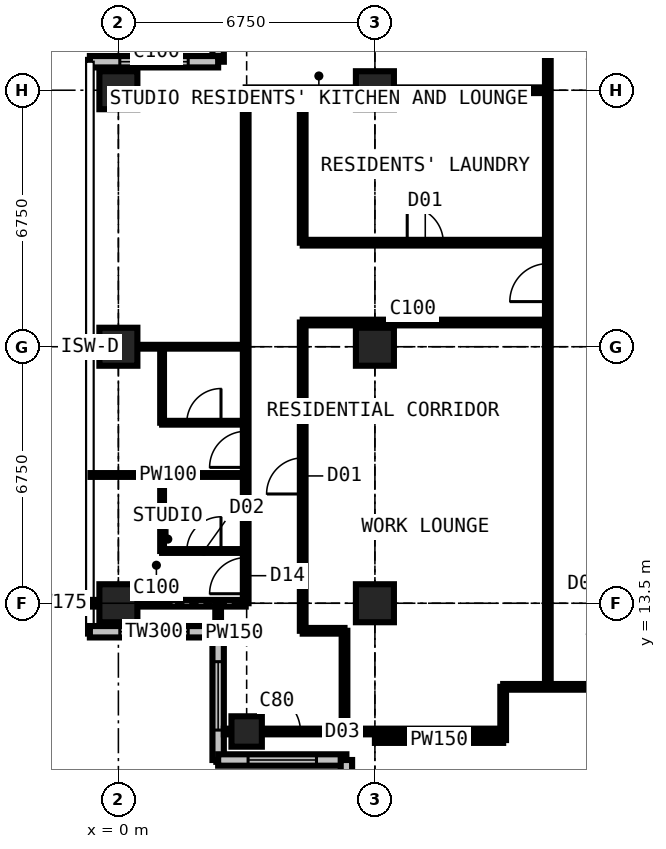
"""IFC4 building model, lengths in metres.
Left out: names, types, materials, properties, quantities, classifications, styles, units other than length and angle.
Written with IfcOpenShell. Run it as: python <this file> out.ifc"""

import sys

from ifc_helpers import new_model, si_unit, direction, frame, frame_2d, origin, origin_2d, place, context, subcontext, project, spatial, rectangle, extrude, element, fill, save


model = new_model("IFC4")
c1 = context("Model", 3, precision=1e-05, world=origin(), true_north=direction((0.0, 1.0)))
c2 = subcontext(c1, "Body", "Model", "MODEL_VIEW")
j1 = project(units=[si_unit("LENGTHUNIT", "METRE"), si_unit("PLANEANGLEUNIT", "RADIAN")], contexts=[c1])
p1 = place(None, origin())
s1 = spatial("IfcSite", under=j1, at=p1, CompositionType="ELEMENT")
p2 = place(p1, origin())
s2 = spatial("IfcBuilding", under=s1, at=p2, CompositionType="ELEMENT")
p3 = place(p2, frame((0.0, 0.0, 247.5)))
s3 = spatial("IfcBuildingStorey", under=s2, at=p3, CompositionType="ELEMENT", Elevation=247.5)
for number, where, z_axis, x_axis in (
    (1, (0.0, 13.5, 0.0), (0.0, 0.0, 1.0), (1.0, 0.0, 0.0)),
    (2, (0.0, 20.25, 0.0), (0.0, 0.0, 1.0), (1.0, 0.0, 0.0)),
    (3, (0.0, 27.0, 0.0), (0.0, 0.0, 1.0), (1.0, 0.0, 0.0)),
):
    element("IfcColumn", number, at=place(p3, frame(where, z_axis=z_axis, x_axis=x_axis)), inside=s3, PredefinedType="COLUMN", context=c2, shape_type="SweptSolid", body=[
        extrude(rectangle(XDim=1.0, YDim=1.0, at=origin_2d()), origin(), (0.0, 0.0, 1.0), 3.6),
    ])
p4 = place(p3, frame((3.375, 10.125, 0.0), z_axis=(0.0, 0.0, 1.0), x_axis=(1.0, 0.0, 0.0)))
e4 = element("IfcColumn", 4, at=p4, inside=s3, PredefinedType="COLUMN", context=c2, shape_type="SweptSolid", body=[
    extrude(rectangle(XDim=0.8, YDim=0.8, at=origin_2d()), origin(), (0.0, 0.0, 1.0), 3.6),
])
for number, where, z_axis, x_axis in (
    (5, (6.75, 13.5, 0.0), (0.0, 0.0, 1.0), (1.0, 0.0, 0.0)),
    (6, (6.75, 20.25, 0.0), (0.0, 0.0, 1.0), (1.0, 0.0, 0.0)),
    (7, (6.75, 27.0, 0.0), (0.0, 0.0, 1.0), (1.0, 0.0, 0.0)),
):
    element("IfcColumn", number, at=place(p3, frame(where, z_axis=z_axis, x_axis=x_axis)), inside=s3, PredefinedType="COLUMN", context=c2, shape_type="SweptSolid", body=[
        extrude(rectangle(XDim=1.0, YDim=1.0, at=origin_2d()), origin(), (0.0, 0.0, 1.0), 3.6),
    ])
p5 = place(p3, frame((2.625, 31.125, 0.0), z_axis=(0.0, 0.0, 1.0), x_axis=(0.0, -1.0, 0.0)))
e8 = element("IfcWall", 8, at=p5, inside=s3, PredefinedType="SOLIDWALL", context=c2, shape_type="SweptSolid", body=[
    extrude(rectangle(XDim=3.375, YDim=0.3, at=frame_2d((1.688, 0.0))), origin(), (0.0, 0.0, 1.0), 3.375),
])
p6 = place(p5, frame((0.788, 0.0, 0.6)))
e9 = element("IfcOpeningElement", 9, at=p6, cuts=e8, PredefinedType="OPENING", context=c2, shape_type="SweptSolid", body=[
    extrude(rectangle(XDim=1.8, YDim=2.1, at=frame_2d((0.9, 1.05))), frame((0.0, 0.16, 0.0), z_axis=(0.0, -1.0, 0.0), x_axis=(1.0, 0.0, 0.0)), (0.0, 0.0, 1.0), 0.32),
])
p7 = place(p3, frame((2.625, 27.75, 0.0), z_axis=(0.0, 0.0, 1.0), x_axis=(-1.0, 0.0, 0.0)))
e10 = element("IfcWall", 10, at=p7, inside=s3, PredefinedType="SOLIDWALL", context=c2, shape_type="SweptSolid", body=[
    extrude(rectangle(XDim=3.375, YDim=0.3, at=frame_2d((1.688, 0.0))), origin(), (0.0, 0.0, 1.0), 3.375),
])
p8 = place(p7, frame((0.788, 0.0, 0.6)))
e11 = element("IfcOpeningElement", 11, at=p8, cuts=e10, PredefinedType="OPENING", context=c2, shape_type="SweptSolid", body=[
    extrude(rectangle(XDim=1.8, YDim=2.1, at=frame_2d((0.9, 1.05))), frame((0.0, 0.16, 0.0), z_axis=(0.0, -1.0, 0.0), x_axis=(1.0, 0.0, 0.0)), (0.0, 0.0, 1.0), 0.32),
])
p9 = place(p3, frame((-0.75, 12.75, 0.0), z_axis=(0.0, 0.0, 1.0), x_axis=(1.0, 0.0, 0.0)))
e12 = element("IfcWall", 12, at=p9, inside=s3, PredefinedType="SOLIDWALL", context=c2, shape_type="SweptSolid", body=[
    extrude(rectangle(XDim=3.375, YDim=0.3, at=frame_2d((1.688, 0.0))), origin(), (0.0, 0.0, 1.0), 3.375),
])
p10 = place(p9, frame((0.788, 0.0, 0.6)))
e13 = element("IfcOpeningElement", 13, at=p10, cuts=e12, PredefinedType="OPENING", context=c2, shape_type="SweptSolid", body=[
    extrude(rectangle(XDim=1.8, YDim=2.1, at=frame_2d((0.9, 1.05))), frame((0.0, 0.16, 0.0), z_axis=(0.0, -1.0, 0.0), x_axis=(1.0, 0.0, 0.0)), (0.0, 0.0, 1.0), 0.32),
])
p11 = place(p3, frame((2.625, 12.75, 0.0), z_axis=(0.0, 0.0, 1.0), x_axis=(0.0, -1.0, 0.0)))
e14 = element("IfcWall", 14, at=p11, inside=s3, PredefinedType="SOLIDWALL", context=c2, shape_type="SweptSolid", body=[
    extrude(rectangle(XDim=3.375, YDim=0.3, at=frame_2d((1.688, 0.0))), origin(), (0.0, 0.0, 1.0), 3.375),
])
p12 = place(p11, frame((0.788, 0.0, 0.6)))
e15 = element("IfcOpeningElement", 15, at=p12, cuts=e14, PredefinedType="OPENING", context=c2, shape_type="SweptSolid", body=[
    extrude(rectangle(XDim=1.8, YDim=2.1, at=frame_2d((0.9, 1.05))), frame((0.0, 0.16, 0.0), z_axis=(0.0, -1.0, 0.0), x_axis=(1.0, 0.0, 0.0)), (0.0, 0.0, 1.0), 0.32),
])
p13 = place(p3, frame((2.625, 9.375, 0.0), z_axis=(0.0, 0.0, 1.0), x_axis=(1.0, 0.0, 0.0)))
e16 = element("IfcWall", 16, at=p13, inside=s3, PredefinedType="SOLIDWALL", context=c2, shape_type="SweptSolid", body=[
    extrude(rectangle(XDim=3.375, YDim=0.3, at=frame_2d((1.688, 0.0))), origin(), (0.0, 0.0, 1.0), 3.375),
])
p14 = place(p13, frame((0.788, 0.0, 0.6)))
e17 = element("IfcOpeningElement", 17, at=p14, cuts=e16, PredefinedType="OPENING", context=c2, shape_type="SweptSolid", body=[
    extrude(rectangle(XDim=1.8, YDim=2.1, at=frame_2d((0.9, 1.05))), frame((0.0, 0.16, 0.0), z_axis=(0.0, -1.0, 0.0), x_axis=(1.0, 0.0, 0.0)), (0.0, 0.0, 1.0), 0.32),
])
p15 = place(p3, frame((6.0, 9.375, 0.0), z_axis=(0.0, 0.0, 1.0), x_axis=(0.0, -1.0, 0.0)))
e18 = element("IfcWall", 18, at=p15, inside=s3, PredefinedType="SOLIDWALL", context=c2, shape_type="SweptSolid", body=[
    extrude(rectangle(XDim=3.375, YDim=0.3, at=frame_2d((1.688, 0.0))), origin(), (0.0, 0.0, 1.0), 3.375),
])
p16 = place(p15, frame((0.788, 0.0, 0.6)))
e19 = element("IfcOpeningElement", 19, at=p16, cuts=e18, PredefinedType="OPENING", context=c2, shape_type="SweptSolid", body=[
    extrude(rectangle(XDim=1.8, YDim=2.1, at=frame_2d((0.9, 1.05))), frame((0.0, 0.16, 0.0), z_axis=(0.0, -1.0, 0.0), x_axis=(1.0, 0.0, 0.0)), (0.0, 0.0, 1.0), 0.32),
])
p17 = place(p3, frame((-0.734, 13.5, 0.0), z_axis=(0.0, 0.0, 1.0), x_axis=(1.0, 0.0, 0.0)))
e20 = element("IfcWall", 20, at=p17, inside=s3, PredefinedType="PARTITIONING", context=c2, shape_type="SweptSolid", body=[
    extrude(rectangle(XDim=4.084, YDim=0.175, at=frame_2d((2.042, 0.0))), origin(), (0.0, 0.0, 1.0), 2.877),
])
p18 = place(p3, frame((-0.734, 16.875, 0.0), z_axis=(0.0, 0.0, 1.0), x_axis=(1.0, 0.0, 0.0)))
e21 = element("IfcWall", 21, at=p18, inside=s3, PredefinedType="PARTITIONING", context=c2, shape_type="SweptSolid", body=[
    extrude(rectangle(XDim=4.084, YDim=0.1, at=frame_2d((2.042, 0.0))), origin(), (0.0, 0.0, 1.0), 3.375),
])
p19 = place(p3, frame((-0.734, 20.25, 0.0), z_axis=(0.0, 0.0, 1.0), x_axis=(1.0, 0.0, 0.0)))
e22 = element("IfcWall", 22, at=p19, inside=s3, PredefinedType="PARTITIONING", context=c2, shape_type="SweptSolid", body=[
    extrude(rectangle(XDim=4.084, YDim=0.1, at=frame_2d((2.042, 0.0))), origin(), (0.0, 0.0, 1.0), 2.877),
])
p20 = place(p3, frame((1.15, 14.875, 0.0), z_axis=(0.0, 0.0, 1.0), x_axis=(0.0, 1.0, 0.0)))
e23 = element("IfcWall", 23, at=p20, inside=s3, PredefinedType="PARTITIONING", context=c2, shape_type="SweptSolid", body=[
    extrude(rectangle(XDim=2.0, YDim=0.1, at=frame_2d((1.0, 0.0))), origin(), (0.0, 0.0, 1.0), 3.375),
])
p21 = place(p3, frame((1.15, 14.875, 0.0), z_axis=(0.0, 0.0, 1.0), x_axis=(1.0, 0.0, 0.0)))
e24 = element("IfcWall", 24, at=p21, inside=s3, PredefinedType="PARTITIONING", context=c2, shape_type="SweptSolid", body=[
    extrude(rectangle(XDim=2.2, YDim=0.1, at=frame_2d((1.1, 0.0))), origin(), (0.0, 0.0, 1.0), 3.375),
])
p22 = place(p21, frame((0.65, 0.0, 0.0)))
e25 = element("IfcOpeningElement", 25, at=p22, cuts=e24, PredefinedType="OPENING", context=c2, shape_type="SweptSolid", body=[
    extrude(rectangle(XDim=0.9, YDim=2.2, at=frame_2d((0.45, 1.1))), frame((0.0, 0.06, 0.0), z_axis=(0.0, -1.0, 0.0), x_axis=(1.0, 0.0, 0.0)), (0.0, 0.0, 1.0), 0.12),
])
p23 = place(p3, frame((1.15, 18.25, 0.0), z_axis=(0.0, 0.0, 1.0), x_axis=(0.0, 1.0, 0.0)))
e26 = element("IfcWall", 26, at=p23, inside=s3, PredefinedType="PARTITIONING", context=c2, shape_type="SweptSolid", body=[
    extrude(rectangle(XDim=2.0, YDim=0.1, at=frame_2d((1.0, 0.0))), origin(), (0.0, 0.0, 1.0), 3.375),
])
p24 = place(p3, frame((1.15, 18.25, 0.0), z_axis=(0.0, 0.0, 1.0), x_axis=(1.0, 0.0, 0.0)))
e27 = element("IfcWall", 27, at=p24, inside=s3, PredefinedType="PARTITIONING", context=c2, shape_type="SweptSolid", body=[
    extrude(rectangle(XDim=2.2, YDim=0.1, at=frame_2d((1.1, 0.0))), origin(), (0.0, 0.0, 1.0), 3.375),
])
p25 = place(p24, frame((0.65, 0.0, 0.0)))
e28 = element("IfcOpeningElement", 28, at=p25, cuts=e27, PredefinedType="OPENING", context=c2, shape_type="SweptSolid", body=[
    extrude(rectangle(XDim=0.9, YDim=2.2, at=frame_2d((0.45, 1.1))), frame((0.0, 0.06, 0.0), z_axis=(0.0, -1.0, 0.0), x_axis=(1.0, 0.0, 0.0)), (0.0, 0.0, 1.0), 0.12),
])
p26 = place(p3, frame((2.625, 12.766, 0.0), z_axis=(0.0, 0.0, 1.0), x_axis=(0.0, 1.0, 0.0)))
e29 = element("IfcWall", 29, at=p26, inside=s3, PredefinedType="PARTITIONING", context=c2, shape_type="SweptSolid", body=[
    extrude(rectangle(XDim=0.734, YDim=0.15, at=frame_2d((0.367, 0.0))), origin(), (0.0, 0.0, 1.0), 3.375),
])
p27 = place(p3, frame((2.775, 10.125, 0.0), z_axis=(0.0, 0.0, 1.0), x_axis=(1.0, 0.0, 0.0)))
e30 = element("IfcWall", 30, at=p27, inside=s3, PredefinedType="PARTITIONING", context=c2, shape_type="SweptSolid", body=[
    extrude(rectangle(XDim=7.35, YDim=0.15, at=frame_2d((3.675, 0.0))), origin(), (0.0, 0.0, 1.0), 2.877),
])
p28 = place(p27, frame((1.016, 0.0, 0.0)))
e31 = element("IfcOpeningElement", 31, at=p28, cuts=e30, PredefinedType="OPENING", context=c2, shape_type="SweptSolid", body=[
    extrude(rectangle(XDim=1.0, YDim=2.2, at=frame_2d((0.5, 1.1))), frame((0.0, 0.085, 0.0), z_axis=(0.0, -1.0, 0.0), x_axis=(1.0, 0.0, 0.0)), (0.0, 0.0, 1.0), 0.17),
])
p29 = place(p3, frame((3.35, 13.5, 0.0), z_axis=(0.0, 0.0, 1.0), x_axis=(0.0, 1.0, 0.0)))
e32 = element("IfcWall", 32, at=p29, inside=s3, PredefinedType="PARTITIONING", context=c2, shape_type="SweptSolid", body=[
    extrude(rectangle(XDim=13.5, YDim=0.15, at=frame_2d((6.75, 0.0))), origin(), (0.0, 0.0, 1.0), 3.375),
])
p30 = place(p29, frame((0.25, 0.0, 0.0)))
e33 = element("IfcOpeningElement", 33, at=p30, cuts=e32, PredefinedType="OPENING", context=c2, shape_type="SweptSolid", body=[
    extrude(rectangle(XDim=0.95, YDim=2.2, at=frame_2d((0.475, 1.1))), frame((0.0, 0.085, 0.0), z_axis=(0.0, -1.0, 0.0), x_axis=(1.0, 0.0, 0.0)), (0.0, 0.0, 1.0), 0.17),
])
p31 = place(p29, frame((3.575, 0.0, 0.0)))
e34 = element("IfcOpeningElement", 34, at=p31, cuts=e32, PredefinedType="OPENING", context=c2, shape_type="SweptSolid", body=[
    extrude(rectangle(XDim=0.95, YDim=2.2, at=frame_2d((0.475, 1.1))), frame((0.0, 0.085, 0.0), z_axis=(0.0, -1.0, 0.0), x_axis=(1.0, 0.0, 0.0)), (0.0, 0.0, 1.0), 0.17),
])
p32 = place(p3, frame((3.35, 27.0, 0.0), z_axis=(0.0, 0.0, 1.0), x_axis=(1.0, 0.0, 0.0)))
e35 = element("IfcWall", 35, at=p32, inside=s3, PredefinedType="PARTITIONING", context=c2, shape_type="SweptSolid", body=[
    extrude(rectangle(XDim=7.95, YDim=0.15, at=frame_2d((3.975, 0.0))), origin(), (0.0, 0.0, 1.0), 2.877),
])
p33 = place(p3, frame((4.85, 12.775, 0.0), z_axis=(0.0, 0.0, 1.0), x_axis=(0.0, 1.0, 0.0)))
e36 = element("IfcWall", 36, at=p33, inside=s3, PredefinedType="PARTITIONING", context=c2, shape_type="SweptSolid", body=[
    extrude(rectangle(XDim=8.113, YDim=0.15, at=frame_2d((4.056, 0.0))), origin(), (0.0, 0.0, 1.0), 3.375),
])
p34 = place(p33, frame((3.6, 0.0, 0.0)))
e37 = element("IfcOpeningElement", 37, at=p34, cuts=e36, PredefinedType="OPENING", context=c2, shape_type="SweptSolid", body=[
    extrude(rectangle(XDim=0.95, YDim=2.2, at=frame_2d((0.475, 1.1))), frame((0.0, 0.085, 0.0), z_axis=(0.0, -1.0, 0.0), x_axis=(1.0, 0.0, 0.0)), (0.0, 0.0, 1.0), 0.17),
])
p35 = place(p3, frame((4.85, 12.775, 0.0), z_axis=(0.0, 0.0, 1.0), x_axis=(1.0, 0.0, 0.0)))
e38 = element("IfcWall", 38, at=p35, inside=s3, PredefinedType="PARTITIONING", context=c2, shape_type="SweptSolid", body=[
    extrude(rectangle(XDim=1.1, YDim=0.15, at=frame_2d((0.55, 0.0))), origin(), (0.0, 0.0, 1.0), 3.375),
])
p36 = place(p3, frame((4.85, 20.887, 0.0), z_axis=(0.0, 0.0, 1.0), x_axis=(1.0, 0.0, 0.0)))
e39 = element("IfcWall", 39, at=p36, inside=s3, PredefinedType="PARTITIONING", context=c2, shape_type="SweptSolid", body=[
    extrude(rectangle(XDim=6.45, YDim=0.15, at=frame_2d((3.225, 0.0))), origin(), (0.0, 0.0, 1.0), 3.375),
])
p37 = place(p3, frame((4.85, 22.988, 0.0), z_axis=(0.0, 0.0, 1.0), x_axis=(0.0, 1.0, 0.0)))
e40 = element("IfcWall", 40, at=p37, inside=s3, PredefinedType="PARTITIONING", context=c2, shape_type="SweptSolid", body=[
    extrude(rectangle(XDim=4.012, YDim=0.15, at=frame_2d((2.006, 0.0))), origin(), (0.0, 0.0, 1.0), 3.375),
])
p38 = place(p3, frame((4.85, 22.988, 0.0), z_axis=(0.0, 0.0, 1.0), x_axis=(1.0, 0.0, 0.0)))
e41 = element("IfcWall", 41, at=p38, inside=s3, PredefinedType="PARTITIONING", context=c2, shape_type="SweptSolid", body=[
    extrude(rectangle(XDim=6.45, YDim=0.15, at=frame_2d((3.225, 0.0))), origin(), (0.0, 0.0, 1.0), 3.375),
])
p39 = place(p38, frame((2.75, 0.0, 0.0)))
e42 = element("IfcOpeningElement", 42, at=p39, cuts=e41, PredefinedType="OPENING", context=c2, shape_type="SweptSolid", body=[
    extrude(rectangle(XDim=0.95, YDim=2.2, at=frame_2d((0.475, 1.1))), frame((0.0, 0.085, 0.0), z_axis=(0.0, -1.0, 0.0), x_axis=(1.0, 0.0, 0.0)), (0.0, 0.0, 1.0), 0.17),
])
p40 = place(p3, frame((5.95, 10.125, 0.0), z_axis=(0.0, 0.0, 1.0), x_axis=(0.0, 1.0, 0.0)))
e43 = element("IfcWall", 43, at=p40, inside=s3, PredefinedType="PARTITIONING", context=c2, shape_type="SweptSolid", body=[
    extrude(rectangle(XDim=2.65, YDim=0.15, at=frame_2d((1.325, 0.0))), origin(), (0.0, 0.0, 1.0), 3.375),
])
p41 = place(p3, frame((6.75, 9.9, 0.0), z_axis=(0.0, 0.0, 1.0), x_axis=(1.0, 0.0, 0.0)))
e44 = element("IfcWall", 44, at=p41, inside=s3, PredefinedType="PARTITIONING", context=c2, shape_type="SweptSolid", body=[
    extrude(rectangle(XDim=3.375, YDim=0.15, at=frame_2d((1.688, 0.0))), origin(), (0.0, 0.0, 1.0), 3.375),
])
p42 = place(p3, frame((10.125, 9.9, 0.0), z_axis=(0.0, 0.0, 1.0), x_axis=(0.0, 1.0, 0.0)))
e45 = element("IfcWall", 45, at=p42, inside=s3, PredefinedType="PARTITIONING", context=c2, shape_type="SweptSolid", body=[
    extrude(rectangle(XDim=1.4, YDim=0.15, at=frame_2d((0.7, 0.0))), origin(), (0.0, 0.0, 1.0), 3.375),
])
p43 = place(p3, frame((10.125, 11.3, 0.0), z_axis=(0.0, 0.0, 1.0), x_axis=(1.0, 0.0, 0.0)))
e46 = element("IfcWall", 46, at=p43, inside=s3, PredefinedType="PARTITIONING", context=c2, shape_type="SweptSolid", body=[
    extrude(rectangle(XDim=3.375, YDim=0.15, at=frame_2d((1.688, 0.0))), origin(), (0.0, 0.0, 1.0), 3.375),
])
p44 = place(p3, frame((11.3, 11.3, 0.0), z_axis=(0.0, 0.0, 1.0), x_axis=(0.0, 1.0, 0.0)))
e47 = element("IfcWall", 47, at=p44, inside=s3, PredefinedType="PARTITIONING", context=c2, shape_type="SweptSolid", body=[
    extrude(rectangle(XDim=19.3, YDim=0.15, at=frame_2d((9.65, 0.0))), origin(), (0.0, 0.0, 1.0), 3.375),
])
p45 = place(p44, frame((18.1, 0.0, 0.0)))
e48 = element("IfcOpeningElement", 48, at=p45, cuts=e47, PredefinedType="OPENING", context=c2, shape_type="SweptSolid", body=[
    extrude(rectangle(XDim=1.0, YDim=2.2, at=frame_2d((0.5, 1.1))), frame((0.0, 0.085, 0.0), z_axis=(0.0, -1.0, 0.0), x_axis=(1.0, 0.0, 0.0)), (0.0, 0.0, 1.0), 0.17),
])
p46 = place(p44, frame((10.137, 0.0, 0.0)))
e49 = element("IfcOpeningElement", 49, at=p46, cuts=e47, PredefinedType="OPENING", context=c2, shape_type="SweptSolid", body=[
    extrude(rectangle(XDim=1.0, YDim=2.2, at=frame_2d((0.5, 1.1))), frame((0.0, 0.085, 0.0), z_axis=(0.0, -1.0, 0.0), x_axis=(1.0, 0.0, 0.0)), (0.0, 0.0, 1.0), 0.17),
])
p47 = place(p8, origin())
e50 = element("IfcWindow", 50, at=p47, inside=s3, PartitioningType="SINGLE_PANEL", PredefinedType="WINDOW", context=c2, shape_type="SweptSolid", body=[
    extrude(rectangle(XDim=1.8, YDim=2.1, at=frame_2d((0.9, 1.05))), frame((0.0, 0.03, 0.0), z_axis=(0.0, -1.0, 0.0), x_axis=(1.0, 0.0, 0.0)), (0.0, 0.0, 1.0), 0.06),
])
fill(e11, e50)
p48 = place(p10, origin())
e51 = element("IfcWindow", 51, at=p48, inside=s3, PartitioningType="SINGLE_PANEL", PredefinedType="WINDOW", context=c2, shape_type="SweptSolid", body=[
    extrude(rectangle(XDim=1.8, YDim=2.1, at=frame_2d((0.9, 1.05))), frame((0.0, 0.03, 0.0), z_axis=(0.0, -1.0, 0.0), x_axis=(1.0, 0.0, 0.0)), (0.0, 0.0, 1.0), 0.06),
])
fill(e13, e51)
p49 = place(p12, origin())
e52 = element("IfcWindow", 52, at=p49, inside=s3, PartitioningType="SINGLE_PANEL", PredefinedType="WINDOW", context=c2, shape_type="SweptSolid", body=[
    extrude(rectangle(XDim=1.8, YDim=2.1, at=frame_2d((0.9, 1.05))), frame((0.0, 0.03, 0.0), z_axis=(0.0, -1.0, 0.0), x_axis=(1.0, 0.0, 0.0)), (0.0, 0.0, 1.0), 0.06),
])
fill(e15, e52)
p50 = place(p14, origin())
e53 = element("IfcWindow", 53, at=p50, inside=s3, PartitioningType="SINGLE_PANEL", PredefinedType="WINDOW", context=c2, shape_type="SweptSolid", body=[
    extrude(rectangle(XDim=1.8, YDim=2.1, at=frame_2d((0.9, 1.05))), frame((0.0, 0.03, 0.0), z_axis=(0.0, -1.0, 0.0), x_axis=(1.0, 0.0, 0.0)), (0.0, 0.0, 1.0), 0.06),
])
fill(e17, e53)
p51 = place(p28, origin())
e54 = element("IfcDoor", 54, at=p51, inside=s3, OperationType="SINGLE_SWING_LEFT", PredefinedType="DOOR", context=c2, shape_type="SweptSolid", body=[
    extrude(rectangle(XDim=1.0, YDim=2.2, at=frame_2d((0.5, 1.1))), frame((0.0, 0.025, 0.0), z_axis=(0.0, -1.0, 0.0), x_axis=(1.0, 0.0, 0.0)), (0.0, 0.0, 1.0), 0.05),
])
fill(e31, e54)
p52 = place(p30, origin())
e55 = element("IfcDoor", 55, at=p52, inside=s3, OperationType="SINGLE_SWING_LEFT", PredefinedType="DOOR", context=c2, shape_type="SweptSolid", body=[
    extrude(rectangle(XDim=0.95, YDim=2.2, at=frame_2d((0.475, 1.1))), frame((0.0, 0.025, 0.0), z_axis=(0.0, -1.0, 0.0), x_axis=(1.0, 0.0, 0.0)), (0.0, 0.0, 1.0), 0.05),
])
fill(e33, e55)
p53 = place(p22, origin())
e56 = element("IfcDoor", 56, at=p53, inside=s3, OperationType="SINGLE_SWING_RIGHT", PredefinedType="DOOR", context=c2, shape_type="SweptSolid", body=[
    extrude(rectangle(XDim=0.9, YDim=2.2, at=frame_2d((0.45, 1.1))), frame((0.0, 0.025, 0.0), z_axis=(0.0, -1.0, 0.0), x_axis=(1.0, 0.0, 0.0)), (0.0, 0.0, 1.0), 0.05),
])
fill(e25, e56)
p54 = place(p31, origin())
e57 = element("IfcDoor", 57, at=p54, inside=s3, OperationType="SINGLE_SWING_LEFT", PredefinedType="DOOR", context=c2, shape_type="SweptSolid", body=[
    extrude(rectangle(XDim=0.95, YDim=2.2, at=frame_2d((0.475, 1.1))), frame((0.0, 0.025, 0.0), z_axis=(0.0, -1.0, 0.0), x_axis=(1.0, 0.0, 0.0)), (0.0, 0.0, 1.0), 0.05),
])
fill(e34, e57)
p55 = place(p25, origin())
e58 = element("IfcDoor", 58, at=p55, inside=s3, OperationType="SINGLE_SWING_RIGHT", PredefinedType="DOOR", context=c2, shape_type="SweptSolid", body=[
    extrude(rectangle(XDim=0.9, YDim=2.2, at=frame_2d((0.45, 1.1))), frame((0.0, 0.025, 0.0), z_axis=(0.0, -1.0, 0.0), x_axis=(1.0, 0.0, 0.0)), (0.0, 0.0, 1.0), 0.05),
])
fill(e28, e58)
p56 = place(p46, origin())
e59 = element("IfcDoor", 59, at=p56, inside=s3, OperationType="SINGLE_SWING_LEFT", PredefinedType="DOOR", context=c2, shape_type="SweptSolid", body=[
    extrude(rectangle(XDim=1.0, YDim=2.2, at=frame_2d((0.5, 1.1))), frame((0.0, 0.025, 0.0), z_axis=(0.0, -1.0, 0.0), x_axis=(1.0, 0.0, 0.0)), (0.0, 0.0, 1.0), 0.05),
])
fill(e49, e59)
p57 = place(p39, origin())
e60 = element("IfcDoor", 60, at=p57, inside=s3, OperationType="SINGLE_SWING_LEFT", PredefinedType="DOOR", context=c2, shape_type="SweptSolid", body=[
    extrude(rectangle(XDim=0.95, YDim=2.2, at=frame_2d((0.475, 1.1))), frame((0.0, 0.025, 0.0), z_axis=(0.0, -1.0, 0.0), x_axis=(1.0, 0.0, 0.0)), (0.0, 0.0, 1.0), 0.05),
])
fill(e42, e60)
p58 = place(p34, origin())
e61 = element("IfcDoor", 61, at=p58, inside=s3, OperationType="SINGLE_SWING_LEFT", PredefinedType="DOOR", context=c2, shape_type="SweptSolid", body=[
    extrude(rectangle(XDim=0.95, YDim=2.2, at=frame_2d((0.475, 1.1))), frame((0.0, 0.025, 0.0), z_axis=(0.0, -1.0, 0.0), x_axis=(1.0, 0.0, 0.0)), (0.0, 0.0, 1.0), 0.05),
])
fill(e37, e61)
save(model, sys.argv[1])
